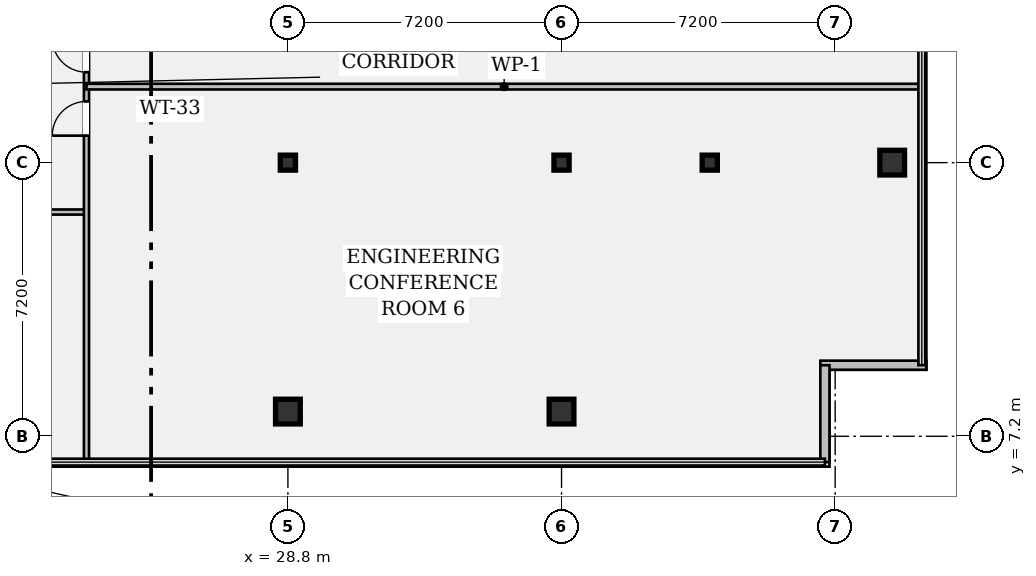
"""IFC4 building model, lengths in metres.
Left out: names, types, materials, properties, quantities, classifications, styles, units other than length and angle.
Written with IfcOpenShell. Run it as: python <this file> out.ifc"""

import sys

from ifc_helpers import new_model, si_unit, direction, frame, frame_2d, origin, origin_2d, place, context, subcontext, project, spatial, rectangle, hollow_rectangle, i_section, extrude, element, fill, save


model = new_model("IFC4")
c1 = context("Model", 3, precision=1e-05, world=origin(), true_north=direction((0.0, 1.0)))
c2 = subcontext(c1, "Body", "Model", "MODEL_VIEW")
j1 = project(units=[si_unit("LENGTHUNIT", "METRE"), si_unit("PLANEANGLEUNIT", "RADIAN")], contexts=[c1])
p1 = place(None, origin())
s1 = spatial("IfcSite", under=j1, at=p1, CompositionType="ELEMENT")
p2 = place(p1, origin())
s2 = spatial("IfcBuilding", under=s1, at=p2, CompositionType="ELEMENT")
p3 = place(p2, frame((0.0, 0.0, 255.15)))
s3 = spatial("IfcBuildingStorey", under=s2, at=p3, CompositionType="ELEMENT", Elevation=255.15)
p4 = place(p3, frame((28.8, 7.85, 0.0), z_axis=(0.0, 0.0, 1.0), x_axis=(1.0, 0.0, 0.0)))
e1 = element("IfcColumn", 1, at=p4, inside=s3, PredefinedType="COLUMN", context=c2, shape_type="SweptSolid", body=[
    extrude(hollow_rectangle(XDim=0.65, YDim=0.65, WallThickness=0.04, at=origin_2d()), origin(), (0.0, 0.0, 1.0), 3.24),
])
p5 = place(p3, frame((28.8, 14.4, 0.0), z_axis=(0.0, 0.0, 1.0), x_axis=(1.0, 0.0, 0.0)))
e2 = element("IfcColumn", 2, at=p5, inside=s3, PredefinedType="COLUMN", context=c2, shape_type="SweptSolid", body=[
    extrude(i_section(OverallWidth=0.399, OverallDepth=0.394, WebThickness=0.023, FlangeThickness=0.037, FilletRadius=0.018, at=origin_2d()), origin(), (0.0, 0.0, 1.0), 3.24),
])
p6 = place(p3, frame((36.0, 7.85, 0.0), z_axis=(0.0, 0.0, 1.0), x_axis=(1.0, 0.0, 0.0)))
e3 = element("IfcColumn", 3, at=p6, inside=s3, PredefinedType="COLUMN", context=c2, shape_type="SweptSolid", body=[
    extrude(hollow_rectangle(XDim=0.65, YDim=0.65, WallThickness=0.04, at=origin_2d()), origin(), (0.0, 0.0, 1.0), 3.24),
])
for number, where, z_axis, x_axis in (
    (4, (36.0, 14.4, 0.0), (0.0, 0.0, 1.0), (1.0, 0.0, 0.0)),
    (5, (39.9, 14.4, 0.0), (0.0, 0.0, 1.0), (1.0, 0.0, 0.0)),
):
    element("IfcColumn", number, at=place(p3, frame(where, z_axis=z_axis, x_axis=x_axis)), inside=s3, PredefinedType="COLUMN", context=c2, shape_type="SweptSolid", body=[
        extrude(i_section(OverallWidth=0.399, OverallDepth=0.394, WebThickness=0.023, FlangeThickness=0.037, FilletRadius=0.018, at=origin_2d()), origin(), (0.0, 0.0, 1.0), 3.24),
    ])
p7 = place(p3, frame((44.7, 14.4, 0.0), z_axis=(0.0, 0.0, 1.0), x_axis=(1.0, 0.0, 0.0)))
e6 = element("IfcColumn", 6, at=p7, inside=s3, PredefinedType="COLUMN", context=c2, shape_type="SweptSolid", body=[
    extrude(hollow_rectangle(XDim=0.65, YDim=0.65, WallThickness=0.04, at=origin_2d()), origin(), (0.0, 0.0, 1.0), 3.24),
])
p8 = place(p3, frame((45.6, 9.07, 0.0), z_axis=(0.0, 0.0, 1.0), x_axis=(-1.0, 0.0, 0.0)))
e7 = element("IfcWall", 7, at=p8, inside=s3, PredefinedType="STANDARD", context=c2, shape_type="SweptSolid", body=[
    extrude(rectangle(XDim=2.79, YDim=0.24, at=frame_2d((1.395, 0.0))), origin(), (0.0, 0.0, 1.0), 3.24),
])
p9 = place(p3, frame((42.93, 9.07, 0.0), z_axis=(0.0, 0.0, 1.0), x_axis=(0.0, -1.0, 0.0)))
e8 = element("IfcWall", 8, at=p9, inside=s3, PredefinedType="STANDARD", context=c2, shape_type="SweptSolid", body=[
    extrude(rectangle(XDim=2.55, YDim=0.24, at=frame_2d((1.275, 0.0))), origin(), (0.0, 0.0, 1.0), 3.24),
])
p10 = place(p3, frame((21.55, 13.1, 0.0), z_axis=(0.0, 0.0, 1.0), x_axis=(1.0, 0.0, 0.0)))
e9 = element("IfcWall", 9, at=p10, inside=s3, PredefinedType="PARTITIONING", context=c2, shape_type="SweptSolid", body=[
    extrude(rectangle(XDim=1.95, YDim=0.135, at=frame_2d((0.975, 0.0))), origin(), (0.0, 0.0, 1.0), 2.676),
])
p11 = place(p3, frame((23.5, 6.52, 0.0), z_axis=(0.0, 0.0, 1.0), x_axis=(0.0, 1.0, 0.0)))
e10 = element("IfcWall", 10, at=p11, inside=s3, PredefinedType="PARTITIONING", context=c2, shape_type="SweptSolid", body=[
    extrude(rectangle(XDim=18.56, YDim=0.135, at=frame_2d((9.28, 0.0))), origin(), (0.0, 0.0, 1.0), 2.676),
])
p12 = place(p11, frame((8.59, 0.0, 0.0)))
e11 = element("IfcOpeningElement", 11, at=p12, cuts=e10, PredefinedType="OPENING", context=c2, shape_type="SweptSolid", body=[
    extrude(rectangle(XDim=0.9, YDim=2.15, at=frame_2d((0.45, 1.075))), frame((0.0, 0.08, 0.0), z_axis=(0.0, -1.0, 0.0), x_axis=(1.0, 0.0, 0.0)), (0.0, 0.0, 1.0), 0.159),
])
p13 = place(p11, frame((10.26, 0.0, 0.0)))
e12 = element("IfcOpeningElement", 12, at=p13, cuts=e10, PredefinedType="OPENING", context=c2, shape_type="SweptSolid", body=[
    extrude(rectangle(XDim=0.9, YDim=2.15, at=frame_2d((0.45, 1.075))), frame((0.0, 0.08, 0.0), z_axis=(0.0, -1.0, 0.0), x_axis=(1.0, 0.0, 0.0)), (0.0, 0.0, 1.0), 0.159),
])
p14 = place(p3, frame((23.5, 16.4, 0.0), z_axis=(0.0, 0.0, 1.0), x_axis=(1.0, 0.0, 0.0)))
e13 = element("IfcWall", 13, at=p14, inside=s3, PredefinedType="PARTITIONING", context=c2, shape_type="SweptSolid", body=[
    extrude(rectangle(XDim=21.98, YDim=0.15, at=frame_2d((10.99, 0.0))), origin(), (0.0, 0.0, 1.0), 2.676),
])
p15 = place(p12, origin())
e14 = element("IfcDoor", 14, at=p15, inside=s3, OperationType="SINGLE_SWING_LEFT", PredefinedType="DOOR", context=c2, shape_type="SweptSolid", body=[
    extrude(rectangle(XDim=0.9, YDim=2.15, at=frame_2d((0.45, 1.075))), frame((0.0, 0.025, 0.0), z_axis=(0.0, -1.0, 0.0), x_axis=(1.0, 0.0, 0.0)), (0.0, 0.0, 1.0), 0.05),
])
fill(e11, e14)
p16 = place(p13, origin())
e15 = element("IfcDoor", 15, at=p16, inside=s3, OperationType="SINGLE_SWING_RIGHT", PredefinedType="DOOR", context=c2, shape_type="SweptSolid", body=[
    extrude(rectangle(XDim=0.9, YDim=2.15, at=frame_2d((0.45, 1.075))), frame((0.0, 0.025, 0.0), z_axis=(0.0, -1.0, 0.0), x_axis=(1.0, 0.0, 0.0)), (0.0, 0.0, 1.0), 0.05),
])
fill(e12, e15)
save(model, sys.argv[1])
